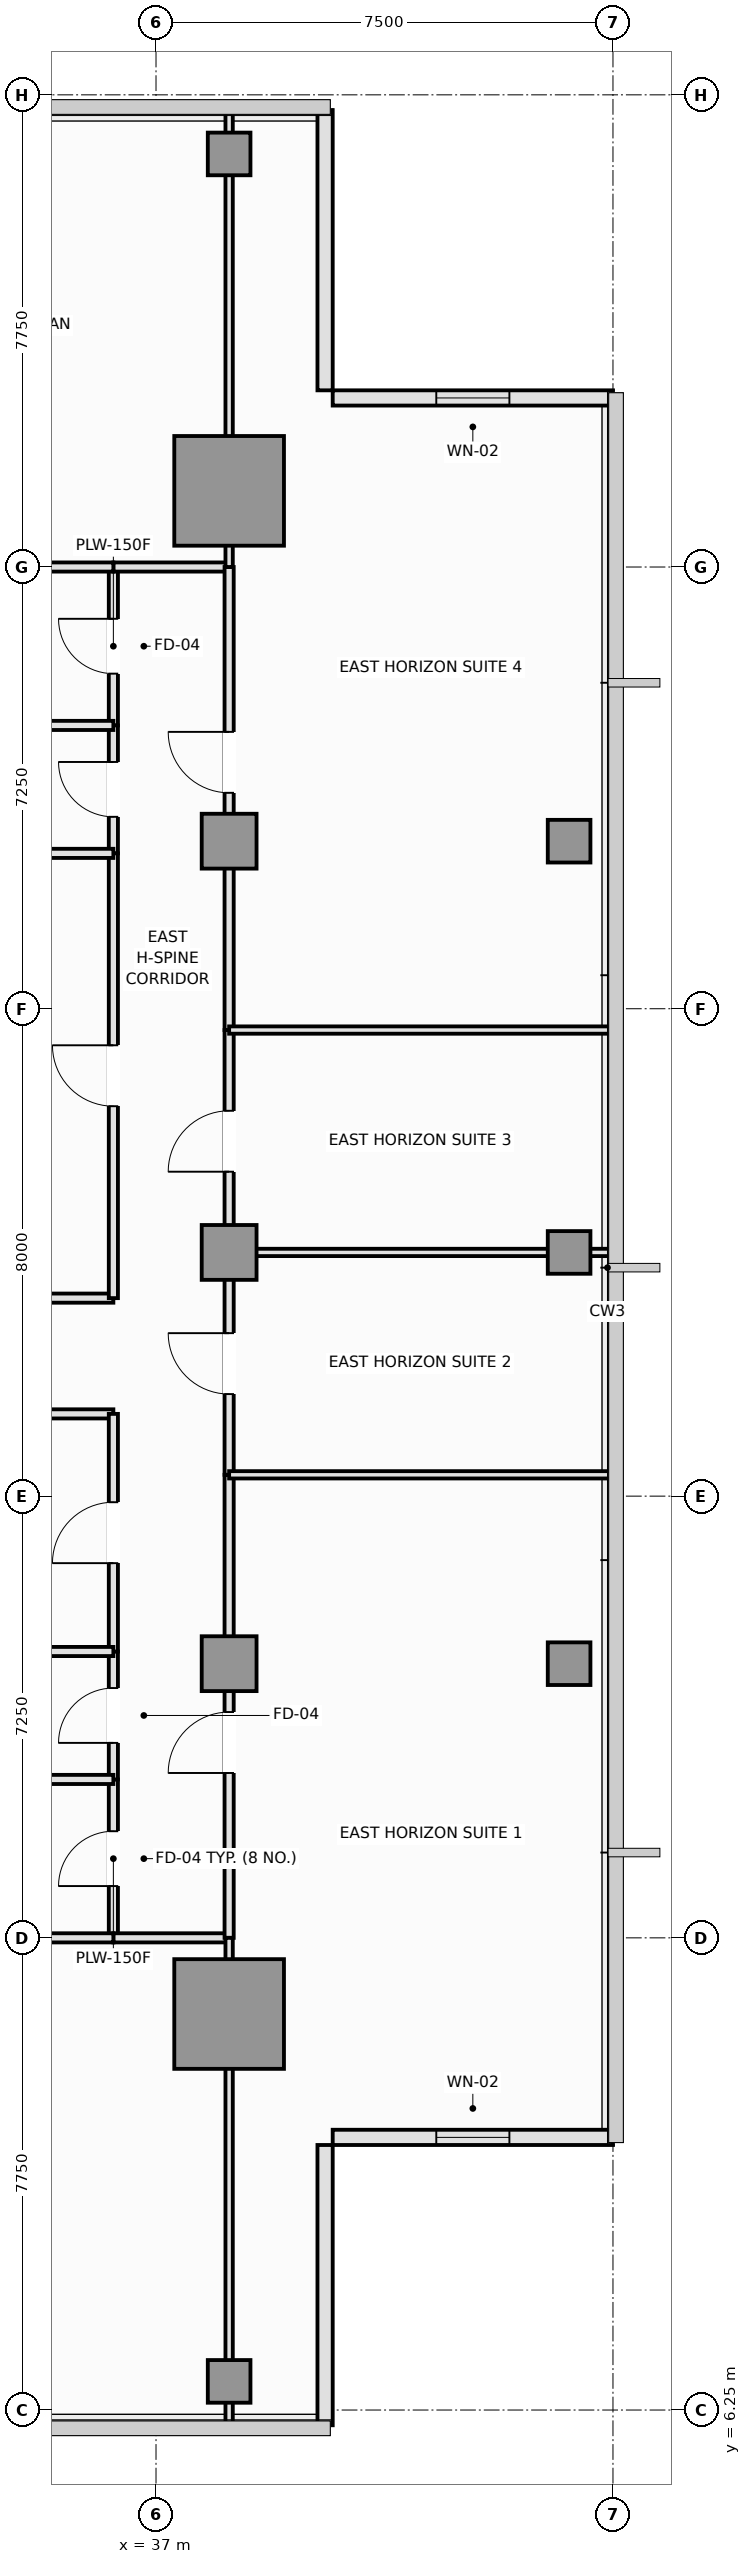
"""IFC4 building model, lengths in metres.
Left out: names, types, materials, properties, quantities, classifications, styles, units other than length and angle.
Written with IfcOpenShell. Run it as: python <this file> out.ifc"""

import sys

from ifc_helpers import new_model, si_unit, direction, frame, frame_2d, origin, origin_2d, place, context, subcontext, project, spatial, rectangle, extrude, element, fill, save


model = new_model("IFC4")
c1 = context("Model", 3, precision=1e-05, world=origin(), true_north=direction((0.0, 1.0)))
c2 = subcontext(c1, "Body", "Model", "MODEL_VIEW")
j1 = project(units=[si_unit("LENGTHUNIT", "METRE"), si_unit("PLANEANGLEUNIT", "RADIAN")], contexts=[c1])
p1 = place(None, origin())
s1 = spatial("IfcSite", under=j1, at=p1, CompositionType="ELEMENT")
p2 = place(p1, origin())
s2 = spatial("IfcBuilding", under=s1, at=p2, CompositionType="ELEMENT")
p3 = place(p2, frame((0.0, 0.0, 249.25)))
s3 = spatial("IfcBuildingStorey", under=s2, at=p3, CompositionType="ELEMENT", Elevation=249.25)
for number, where, z_axis, x_axis in (
    (1, (38.2, 12.75, 0.0), (0.0, 0.0, 1.0), (1.0, 0.0, 0.0)),
    (2, (38.2, 37.75, 0.0), (0.0, 0.0, 1.0), (1.0, 0.0, 0.0)),
):
    element("IfcColumn", number, at=place(p3, frame(where, z_axis=z_axis, x_axis=x_axis)), inside=s3, PredefinedType="COLUMN", context=c2, shape_type="SweptSolid", body=[
        extrude(rectangle(XDim=1.8, YDim=1.8, at=origin_2d()), origin(), (0.0, 0.0, 1.0), 3.55),
    ])
for number, where, z_axis, x_axis in (
    (3, (38.2, 18.5, 0.0), (0.0, 0.0, 1.0), (1.0, 0.0, 0.0)),
    (4, (38.2, 25.25, 0.0), (0.0, 0.0, 1.0), (1.0, 0.0, 0.0)),
    (5, (38.2, 32.0, 0.0), (0.0, 0.0, 1.0), (1.0, 0.0, 0.0)),
):
    element("IfcColumn", number, at=place(p3, frame(where, z_axis=z_axis, x_axis=x_axis)), inside=s3, PredefinedType="COLUMN", context=c2, shape_type="SweptSolid", body=[
        extrude(rectangle(XDim=0.9, YDim=0.9, at=origin_2d()), origin(), (0.0, 0.0, 1.0), 3.55),
    ])
for number, where, z_axis, x_axis in (
    (6, (43.78, 18.5, 0.0), (0.0, 0.0, 1.0), (1.0, 0.0, 0.0)),
    (7, (43.78, 25.25, 0.0), (0.0, 0.0, 1.0), (1.0, 0.0, 0.0)),
    (8, (43.78, 32.0, 0.0), (0.0, 0.0, 1.0), (1.0, 0.0, 0.0)),
    (9, (38.2, 6.72, 0.0), (0.0, 0.0, 1.0), (1.0, 0.0, 0.0)),
    (10, (38.2, 43.28, 0.0), (0.0, 0.0, 1.0), (1.0, 0.0, 0.0)),
):
    element("IfcColumn", number, at=place(p3, frame(where, z_axis=z_axis, x_axis=x_axis)), inside=s3, PredefinedType="COLUMN", context=c2, shape_type="SweptSolid", body=[
        extrude(rectangle(XDim=0.7, YDim=0.7, at=origin_2d()), origin(), (0.0, 0.0, 1.0), 3.55),
    ])
p4 = place(p3, frame((39.775, 6.0, 0.0), z_axis=(0.0, 0.0, 1.0), x_axis=(0.0, 1.0, 0.0)))
e11 = element("IfcWall", 11, at=p4, inside=s3, PredefinedType="SOLIDWALL", context=c2, shape_type="SweptSolid", body=[
    extrude(rectangle(XDim=4.6, YDim=0.25, at=frame_2d((2.3, 0.0))), origin(), (0.0, 0.0, 1.0), 3.39),
])
p5 = place(p3, frame((39.9, 10.725, 0.0), z_axis=(0.0, 0.0, 1.0), x_axis=(1.0, 0.0, 0.0)))
e12 = element("IfcWall", 12, at=p5, inside=s3, PredefinedType="SOLIDWALL", context=c2, shape_type="SweptSolid", body=[
    extrude(rectangle(XDim=4.6, YDim=0.25, at=frame_2d((2.3, 0.0))), origin(), (0.0, 0.0, 1.0), 3.39),
])
p6 = place(p5, frame((1.7, 0.0, 0.9)))
e13 = element("IfcOpeningElement", 13, at=p6, cuts=e12, PredefinedType="OPENING", context=c2, shape_type="SweptSolid", body=[
    extrude(rectangle(XDim=1.2, YDim=1.8, at=frame_2d((0.6, 0.9))), frame((0.0, 0.135, 0.0), z_axis=(0.0, -1.0, 0.0), x_axis=(1.0, 0.0, 0.0)), (0.0, 0.0, 1.0), 0.27),
])
p7 = place(p3, frame((44.5, 39.275, 0.0), z_axis=(0.0, 0.0, 1.0), x_axis=(-1.0, 0.0, 0.0)))
e14 = element("IfcWall", 14, at=p7, inside=s3, PredefinedType="SOLIDWALL", context=c2, shape_type="SweptSolid", body=[
    extrude(rectangle(XDim=4.6, YDim=0.25, at=frame_2d((2.3, 0.0))), origin(), (0.0, 0.0, 1.0), 3.39),
])
p8 = place(p7, frame((1.7, 0.0, 0.9)))
e15 = element("IfcOpeningElement", 15, at=p8, cuts=e14, PredefinedType="OPENING", context=c2, shape_type="SweptSolid", body=[
    extrude(rectangle(XDim=1.2, YDim=1.8, at=frame_2d((0.6, 0.9))), frame((0.0, 0.135, 0.0), z_axis=(0.0, -1.0, 0.0), x_axis=(1.0, 0.0, 0.0)), (0.0, 0.0, 1.0), 0.27),
])
p9 = place(p3, frame((39.775, 39.4, 0.0), z_axis=(0.0, 0.0, 1.0), x_axis=(0.0, 1.0, 0.0)))
e16 = element("IfcWall", 16, at=p9, inside=s3, PredefinedType="SOLIDWALL", context=c2, shape_type="SweptSolid", body=[
    extrude(rectangle(XDim=4.6, YDim=0.25, at=frame_2d((2.3, 0.0))), origin(), (0.0, 0.0, 1.0), 3.39),
])
p10 = place(p3, frame((29.25, 22.6, 0.0), z_axis=(0.0, 0.0, 1.0), x_axis=(1.0, 0.0, 0.0)))
e17 = element("IfcWall", 17, at=p10, inside=s3, PredefinedType="PARTITIONING", context=c2, shape_type="SweptSolid", body=[
    extrude(rectangle(XDim=7.05, YDim=0.15, at=frame_2d((3.525, 0.0))), origin(), (0.0, 0.0, 1.0), 3.39),
])
p11 = place(p3, frame((26.62, 24.5, 0.0), z_axis=(0.0, 0.0, 1.0), x_axis=(1.0, 0.0, 0.0)))
e18 = element("IfcWall", 18, at=p11, inside=s3, PredefinedType="PARTITIONING", context=c2, shape_type="SweptSolid", body=[
    extrude(rectangle(XDim=9.68, YDim=0.15, at=frame_2d((4.84, 0.0))), origin(), (0.0, 0.0, 1.0), 3.39),
])
p12 = place(p3, frame((36.3, 14.0, 0.0), z_axis=(0.0, 0.0, 1.0), x_axis=(0.0, 1.0, 0.0)))
e19 = element("IfcWall", 19, at=p12, inside=s3, PredefinedType="PLUMBINGWALL", context=c2, shape_type="SweptSolid", body=[
    extrude(rectangle(XDim=2.6, YDim=0.15, at=frame_2d((1.3, 0.0))), origin(), (0.0, 0.0, 1.0), 3.39),
])
p13 = place(p12, frame((0.85, 0.0, 0.0)))
e20 = element("IfcOpeningElement", 20, at=p13, cuts=e19, PredefinedType="OPENING", context=c2, shape_type="SweptSolid", body=[
    extrude(rectangle(XDim=0.9, YDim=2.1, at=frame_2d((0.45, 1.05))), frame((0.0, 0.085, 0.0), z_axis=(0.0, -1.0, 0.0), x_axis=(1.0, 0.0, 0.0)), (0.0, 0.0, 1.0), 0.17),
])
p14 = place(p3, frame((36.3, 33.9, 0.0), z_axis=(0.0, 0.0, 1.0), x_axis=(0.0, 1.0, 0.0)))
e21 = element("IfcWall", 21, at=p14, inside=s3, PredefinedType="PLUMBINGWALL", context=c2, shape_type="SweptSolid", body=[
    extrude(rectangle(XDim=2.6, YDim=0.15, at=frame_2d((1.3, 0.0))), origin(), (0.0, 0.0, 1.0), 3.39),
])
p15 = place(p14, frame((0.85, 0.0, 0.0)))
e22 = element("IfcOpeningElement", 22, at=p15, cuts=e21, PredefinedType="OPENING", context=c2, shape_type="SweptSolid", body=[
    extrude(rectangle(XDim=0.9, YDim=2.1, at=frame_2d((0.45, 1.05))), frame((0.0, 0.085, 0.0), z_axis=(0.0, -1.0, 0.0), x_axis=(1.0, 0.0, 0.0)), (0.0, 0.0, 1.0), 0.17),
])
p16 = place(p3, frame((36.3, 16.6, 0.0), z_axis=(0.0, 0.0, 1.0), x_axis=(0.0, 1.0, 0.0)))
e23 = element("IfcWall", 23, at=p16, inside=s3, PredefinedType="PLUMBINGWALL", context=c2, shape_type="SweptSolid", body=[
    extrude(rectangle(XDim=2.1, YDim=0.15, at=frame_2d((1.05, 0.0))), origin(), (0.0, 0.0, 1.0), 3.39),
])
p17 = place(p16, frame((0.6, 0.0, 0.0)))
e24 = element("IfcOpeningElement", 24, at=p17, cuts=e23, PredefinedType="OPENING", context=c2, shape_type="SweptSolid", body=[
    extrude(rectangle(XDim=0.9, YDim=2.1, at=frame_2d((0.45, 1.05))), frame((0.0, 0.085, 0.0), z_axis=(0.0, -1.0, 0.0), x_axis=(1.0, 0.0, 0.0)), (0.0, 0.0, 1.0), 0.17),
])
p18 = place(p3, frame((36.3, 31.8, 0.0), z_axis=(0.0, 0.0, 1.0), x_axis=(0.0, 1.0, 0.0)))
e25 = element("IfcWall", 25, at=p18, inside=s3, PredefinedType="PLUMBINGWALL", context=c2, shape_type="SweptSolid", body=[
    extrude(rectangle(XDim=2.1, YDim=0.15, at=frame_2d((1.05, 0.0))), origin(), (0.0, 0.0, 1.0), 3.39),
])
p19 = place(p18, frame((0.6, 0.0, 0.0)))
e26 = element("IfcOpeningElement", 26, at=p19, cuts=e25, PredefinedType="OPENING", context=c2, shape_type="SweptSolid", body=[
    extrude(rectangle(XDim=0.9, YDim=2.1, at=frame_2d((0.45, 1.05))), frame((0.0, 0.085, 0.0), z_axis=(0.0, -1.0, 0.0), x_axis=(1.0, 0.0, 0.0)), (0.0, 0.0, 1.0), 0.17),
])
p20 = place(p3, frame((36.3, 18.7, 0.0), z_axis=(0.0, 0.0, 1.0), x_axis=(0.0, 1.0, 0.0)))
e27 = element("IfcWall", 27, at=p20, inside=s3, PredefinedType="PARTITIONING", context=c2, shape_type="SweptSolid", body=[
    extrude(rectangle(XDim=3.9, YDim=0.15, at=frame_2d((1.95, 0.0))), origin(), (0.0, 0.0, 1.0), 3.39),
])
p21 = place(p20, frame((1.45, 0.0, 0.0)))
e28 = element("IfcOpeningElement", 28, at=p21, cuts=e27, PredefinedType="OPENING", context=c2, shape_type="SweptSolid", body=[
    extrude(rectangle(XDim=1.0, YDim=2.15, at=frame_2d((0.5, 1.075))), frame((0.0, 0.085, 0.0), z_axis=(0.0, -1.0, 0.0), x_axis=(1.0, 0.0, 0.0)), (0.0, 0.0, 1.0), 0.17),
])
p22 = place(p3, frame((36.3, 24.5, 0.0), z_axis=(0.0, 0.0, 1.0), x_axis=(0.0, 1.0, 0.0)))
e29 = element("IfcWall", 29, at=p22, inside=s3, PredefinedType="PARTITIONING", context=c2, shape_type="SweptSolid", body=[
    extrude(rectangle(XDim=7.3, YDim=0.15, at=frame_2d((3.65, 0.0))), origin(), (0.0, 0.0, 1.0), 3.39),
])
p23 = place(p22, frame((3.15, 0.0, 0.0)))
e30 = element("IfcOpeningElement", 30, at=p23, cuts=e29, PredefinedType="OPENING", context=c2, shape_type="SweptSolid", body=[
    extrude(rectangle(XDim=1.0, YDim=2.15, at=frame_2d((0.5, 1.075))), frame((0.0, 0.085, 0.0), z_axis=(0.0, -1.0, 0.0), x_axis=(1.0, 0.0, 0.0)), (0.0, 0.0, 1.0), 0.17),
])
for number, where, z_axis, x_axis in (
    (31, (36.3, 14.0, 0.0), (0.0, 0.0, 1.0), (1.0, 0.0, 0.0)),
    (32, (36.3, 36.5, 0.0), (0.0, 0.0, 1.0), (1.0, 0.0, 0.0)),
):
    element("IfcWall", number, at=place(p3, frame(where, z_axis=z_axis, x_axis=x_axis)), inside=s3, PredefinedType="PARTITIONING", context=c2, shape_type="SweptSolid", body=[
        extrude(rectangle(XDim=1.9, YDim=0.15, at=frame_2d((0.95, 0.0))), origin(), (0.0, 0.0, 1.0), 3.39),
    ])
p24 = place(p3, frame((38.2, 14.0, 0.0), z_axis=(0.0, 0.0, 1.0), x_axis=(0.0, 1.0, 0.0)))
e33 = element("IfcWall", 33, at=p24, inside=s3, PredefinedType="PARTITIONING", context=c2, shape_type="SweptSolid", body=[
    extrude(rectangle(XDim=7.6, YDim=0.15, at=frame_2d((3.8, 0.0))), origin(), (0.0, 0.0, 1.0), 2.99),
])
p25 = place(p24, frame((2.706, 0.0, 0.0)))
e34 = element("IfcOpeningElement", 34, at=p25, cuts=e33, PredefinedType="OPENING", context=c2, shape_type="SweptSolid", body=[
    extrude(rectangle(XDim=1.0, YDim=2.15, at=frame_2d((0.5, 1.075))), frame((0.0, 0.085, 0.0), z_axis=(0.0, -1.0, 0.0), x_axis=(1.0, 0.0, 0.0)), (0.0, 0.0, 1.0), 0.17),
])
p26 = place(p3, frame((38.2, 21.6, 0.0), z_axis=(0.0, 0.0, 1.0), x_axis=(0.0, 1.0, 0.0)))
e35 = element("IfcWall", 35, at=p26, inside=s3, PredefinedType="PARTITIONING", context=c2, shape_type="SweptSolid", body=[
    extrude(rectangle(XDim=3.65, YDim=0.15, at=frame_2d((1.825, 0.0))), origin(), (0.0, 0.0, 1.0), 2.99),
])
p27 = place(p26, frame((1.325, 0.0, 0.0)))
e36 = element("IfcOpeningElement", 36, at=p27, cuts=e35, PredefinedType="OPENING", context=c2, shape_type="SweptSolid", body=[
    extrude(rectangle(XDim=1.0, YDim=2.15, at=frame_2d((0.5, 1.075))), frame((0.0, 0.085, 0.0), z_axis=(0.0, -1.0, 0.0), x_axis=(1.0, 0.0, 0.0)), (0.0, 0.0, 1.0), 0.17),
])
p28 = place(p3, frame((38.2, 25.25, 0.0), z_axis=(0.0, 0.0, 1.0), x_axis=(0.0, 1.0, 0.0)))
e37 = element("IfcWall", 37, at=p28, inside=s3, PredefinedType="PARTITIONING", context=c2, shape_type="SweptSolid", body=[
    extrude(rectangle(XDim=3.65, YDim=0.15, at=frame_2d((1.825, 0.0))), origin(), (0.0, 0.0, 1.0), 2.99),
])
p29 = place(p28, frame((1.325, 0.0, 0.0)))
e38 = element("IfcOpeningElement", 38, at=p29, cuts=e37, PredefinedType="OPENING", context=c2, shape_type="SweptSolid", body=[
    extrude(rectangle(XDim=1.0, YDim=2.15, at=frame_2d((0.5, 1.075))), frame((0.0, 0.085, 0.0), z_axis=(0.0, -1.0, 0.0), x_axis=(1.0, 0.0, 0.0)), (0.0, 0.0, 1.0), 0.17),
])
p30 = place(p3, frame((38.2, 28.9, 0.0), z_axis=(0.0, 0.0, 1.0), x_axis=(0.0, 1.0, 0.0)))
e39 = element("IfcWall", 39, at=p30, inside=s3, PredefinedType="PARTITIONING", context=c2, shape_type="SweptSolid", body=[
    extrude(rectangle(XDim=7.6, YDim=0.15, at=frame_2d((3.8, 0.0))), origin(), (0.0, 0.0, 1.0), 2.99),
])
p31 = place(p30, frame((3.894, 0.0, 0.0)))
e40 = element("IfcOpeningElement", 40, at=p31, cuts=e39, PredefinedType="OPENING", context=c2, shape_type="SweptSolid", body=[
    extrude(rectangle(XDim=1.0, YDim=2.15, at=frame_2d((0.5, 1.075))), frame((0.0, 0.085, 0.0), z_axis=(0.0, -1.0, 0.0), x_axis=(1.0, 0.0, 0.0)), (0.0, 0.0, 1.0), 0.17),
])
for number, where, z_axis, x_axis in (
    (41, (32.8, 16.6, 0.0), (0.0, 0.0, 1.0), (1.0, 0.0, 0.0)),
    (42, (32.8, 14.0, 0.0), (0.0, 0.0, 1.0), (1.0, 0.0, 0.0)),
    (43, (32.8, 33.9, 0.0), (0.0, 0.0, 1.0), (1.0, 0.0, 0.0)),
    (44, (32.8, 36.5, 0.0), (0.0, 0.0, 1.0), (1.0, 0.0, 0.0)),
    (45, (32.8, 18.7, 0.0), (0.0, 0.0, 1.0), (1.0, 0.0, 0.0)),
    (46, (32.8, 31.8, 0.0), (0.0, 0.0, 1.0), (1.0, 0.0, 0.0)),
):
    element("IfcWall", number, at=place(p3, frame(where, z_axis=z_axis, x_axis=x_axis)), inside=s3, PredefinedType="PLUMBINGWALL", context=c2, shape_type="SweptSolid", body=[
        extrude(rectangle(XDim=3.5, YDim=0.15, at=frame_2d((1.75, 0.0))), origin(), (0.0, 0.0, 1.0), 3.39),
    ])
p32 = place(p3, frame((38.2, 6.01, 0.0), z_axis=(0.0, 0.0, 1.0), x_axis=(0.0, 1.0, 0.0)))
e47 = element("IfcWall", 47, at=p32, inside=s3, PredefinedType="PARTITIONING", context=c2, shape_type="SweptSolid", body=[
    extrude(rectangle(XDim=7.99, YDim=0.12, at=frame_2d((3.995, 0.0))), origin(), (0.0, 0.0, 1.0), 2.99),
])
p33 = place(p3, frame((38.2, 36.5, 0.0), z_axis=(0.0, 0.0, 1.0), x_axis=(0.0, 1.0, 0.0)))
e48 = element("IfcWall", 48, at=p33, inside=s3, PredefinedType="PARTITIONING", context=c2, shape_type="SweptSolid", body=[
    extrude(rectangle(XDim=7.49, YDim=0.12, at=frame_2d((3.745, 0.0))), origin(), (0.0, 0.0, 1.0), 2.99),
])
p34 = place(p3, frame((38.2, 21.6, 0.0), z_axis=(0.0, 0.0, 1.0), x_axis=(1.0, 0.0, 0.0)))
e49 = element("IfcWall", 49, at=p34, inside=s3, PredefinedType="PARTITIONING", context=c2, shape_type="SweptSolid", body=[
    extrude(rectangle(XDim=6.29, YDim=0.12, at=frame_2d((3.145, 0.0))), origin(), (0.0, 0.0, 1.0), 3.39),
])
p35 = place(p3, frame((38.2, 25.25, 0.0), z_axis=(0.0, 0.0, 1.0), x_axis=(1.0, 0.0, 0.0)))
e50 = element("IfcWall", 50, at=p35, inside=s3, PredefinedType="PARTITIONING", context=c2, shape_type="SweptSolid", body=[
    extrude(rectangle(XDim=6.29, YDim=0.12, at=frame_2d((3.145, 0.0))), origin(), (0.0, 0.0, 1.0), 2.94),
])
p36 = place(p3, frame((38.2, 28.9, 0.0), z_axis=(0.0, 0.0, 1.0), x_axis=(1.0, 0.0, 0.0)))
e51 = element("IfcWall", 51, at=p36, inside=s3, PredefinedType="PARTITIONING", context=c2, shape_type="SweptSolid", body=[
    extrude(rectangle(XDim=6.29, YDim=0.12, at=frame_2d((3.145, 0.0))), origin(), (0.0, 0.0, 1.0), 3.39),
])
p37 = place(p6, origin())
e52 = element("IfcWindow", 52, at=p37, inside=s3, PartitioningType="SINGLE_PANEL", PredefinedType="WINDOW", context=c2, shape_type="SweptSolid", body=[
    extrude(rectangle(XDim=1.2, YDim=1.8, at=frame_2d((0.6, 0.9))), frame((0.0, 0.03, 0.0), z_axis=(0.0, -1.0, 0.0), x_axis=(1.0, 0.0, 0.0)), (0.0, 0.0, 1.0), 0.06),
])
fill(e13, e52)
p38 = place(p8, origin())
e53 = element("IfcWindow", 53, at=p38, inside=s3, PartitioningType="SINGLE_PANEL", PredefinedType="WINDOW", context=c2, shape_type="SweptSolid", body=[
    extrude(rectangle(XDim=1.2, YDim=1.8, at=frame_2d((0.6, 0.9))), frame((0.0, 0.03, 0.0), z_axis=(0.0, -1.0, 0.0), x_axis=(1.0, 0.0, 0.0)), (0.0, 0.0, 1.0), 0.06),
])
fill(e15, e53)
p39 = place(p13, origin())
e54 = element("IfcDoor", 54, at=p39, inside=s3, OperationType="SINGLE_SWING_LEFT", PredefinedType="DOOR", context=c2, shape_type="SweptSolid", body=[
    extrude(rectangle(XDim=0.9, YDim=2.1, at=frame_2d((0.45, 1.05))), frame((0.0, 0.025, 0.0), z_axis=(0.0, -1.0, 0.0), x_axis=(1.0, 0.0, 0.0)), (0.0, 0.0, 1.0), 0.05),
])
fill(e20, e54)
p40 = place(p15, origin())
e55 = element("IfcDoor", 55, at=p40, inside=s3, OperationType="SINGLE_SWING_RIGHT", PredefinedType="DOOR", context=c2, shape_type="SweptSolid", body=[
    extrude(rectangle(XDim=0.9, YDim=2.1, at=frame_2d((0.45, 1.05))), frame((0.0, 0.025, 0.0), z_axis=(0.0, -1.0, 0.0), x_axis=(1.0, 0.0, 0.0)), (0.0, 0.0, 1.0), 0.05),
])
fill(e22, e55)
p41 = place(p17, origin())
e56 = element("IfcDoor", 56, at=p41, inside=s3, OperationType="SINGLE_SWING_LEFT", PredefinedType="DOOR", context=c2, shape_type="SweptSolid", body=[
    extrude(rectangle(XDim=0.9, YDim=2.1, at=frame_2d((0.45, 1.05))), frame((0.0, 0.025, 0.0), z_axis=(0.0, -1.0, 0.0), x_axis=(1.0, 0.0, 0.0)), (0.0, 0.0, 1.0), 0.05),
])
fill(e24, e56)
p42 = place(p19, origin())
e57 = element("IfcDoor", 57, at=p42, inside=s3, OperationType="SINGLE_SWING_RIGHT", PredefinedType="DOOR", context=c2, shape_type="SweptSolid", body=[
    extrude(rectangle(XDim=0.9, YDim=2.1, at=frame_2d((0.45, 1.05))), frame((0.0, 0.025, 0.0), z_axis=(0.0, -1.0, 0.0), x_axis=(1.0, 0.0, 0.0)), (0.0, 0.0, 1.0), 0.05),
])
fill(e26, e57)
p43 = place(p21, origin())
e58 = element("IfcDoor", 58, at=p43, inside=s3, OperationType="SINGLE_SWING_LEFT", PredefinedType="DOOR", context=c2, shape_type="SweptSolid", body=[
    extrude(rectangle(XDim=1.0, YDim=2.15, at=frame_2d((0.5, 1.075))), frame((0.0, 0.025, 0.0), z_axis=(0.0, -1.0, 0.0), x_axis=(1.0, 0.0, 0.0)), (0.0, 0.0, 1.0), 0.05),
])
fill(e28, e58)
p44 = place(p23, origin())
e59 = element("IfcDoor", 59, at=p44, inside=s3, OperationType="SINGLE_SWING_RIGHT", PredefinedType="DOOR", context=c2, shape_type="SweptSolid", body=[
    extrude(rectangle(XDim=1.0, YDim=2.15, at=frame_2d((0.5, 1.075))), frame((0.0, 0.025, 0.0), z_axis=(0.0, -1.0, 0.0), x_axis=(1.0, 0.0, 0.0)), (0.0, 0.0, 1.0), 0.05),
])
fill(e30, e59)
p45 = place(p25, origin())
e60 = element("IfcDoor", 60, at=p45, inside=s3, OperationType="SINGLE_SWING_LEFT", PredefinedType="DOOR", context=c2, shape_type="SweptSolid", body=[
    extrude(rectangle(XDim=1.0, YDim=2.15, at=frame_2d((0.5, 1.075))), frame((0.0, 0.025, 0.0), z_axis=(0.0, -1.0, 0.0), x_axis=(1.0, 0.0, 0.0)), (0.0, 0.0, 1.0), 0.05),
])
fill(e34, e60)
p46 = place(p27, origin())
e61 = element("IfcDoor", 61, at=p46, inside=s3, OperationType="SINGLE_SWING_RIGHT", PredefinedType="DOOR", context=c2, shape_type="SweptSolid", body=[
    extrude(rectangle(XDim=1.0, YDim=2.15, at=frame_2d((0.5, 1.075))), frame((0.0, 0.025, 0.0), z_axis=(0.0, -1.0, 0.0), x_axis=(1.0, 0.0, 0.0)), (0.0, 0.0, 1.0), 0.05),
])
fill(e36, e61)
p47 = place(p29, origin())
e62 = element("IfcDoor", 62, at=p47, inside=s3, OperationType="SINGLE_SWING_LEFT", PredefinedType="DOOR", context=c2, shape_type="SweptSolid", body=[
    extrude(rectangle(XDim=1.0, YDim=2.15, at=frame_2d((0.5, 1.075))), frame((0.0, 0.025, 0.0), z_axis=(0.0, -1.0, 0.0), x_axis=(1.0, 0.0, 0.0)), (0.0, 0.0, 1.0), 0.05),
])
fill(e38, e62)
p48 = place(p31, origin())
e63 = element("IfcDoor", 63, at=p48, inside=s3, OperationType="SINGLE_SWING_RIGHT", PredefinedType="DOOR", context=c2, shape_type="SweptSolid", body=[
    extrude(rectangle(XDim=1.0, YDim=2.15, at=frame_2d((0.5, 1.075))), frame((0.0, 0.025, 0.0), z_axis=(0.0, -1.0, 0.0), x_axis=(1.0, 0.0, 0.0)), (0.0, 0.0, 1.0), 0.05),
])
fill(e40, e63)
save(model, sys.argv[1])
